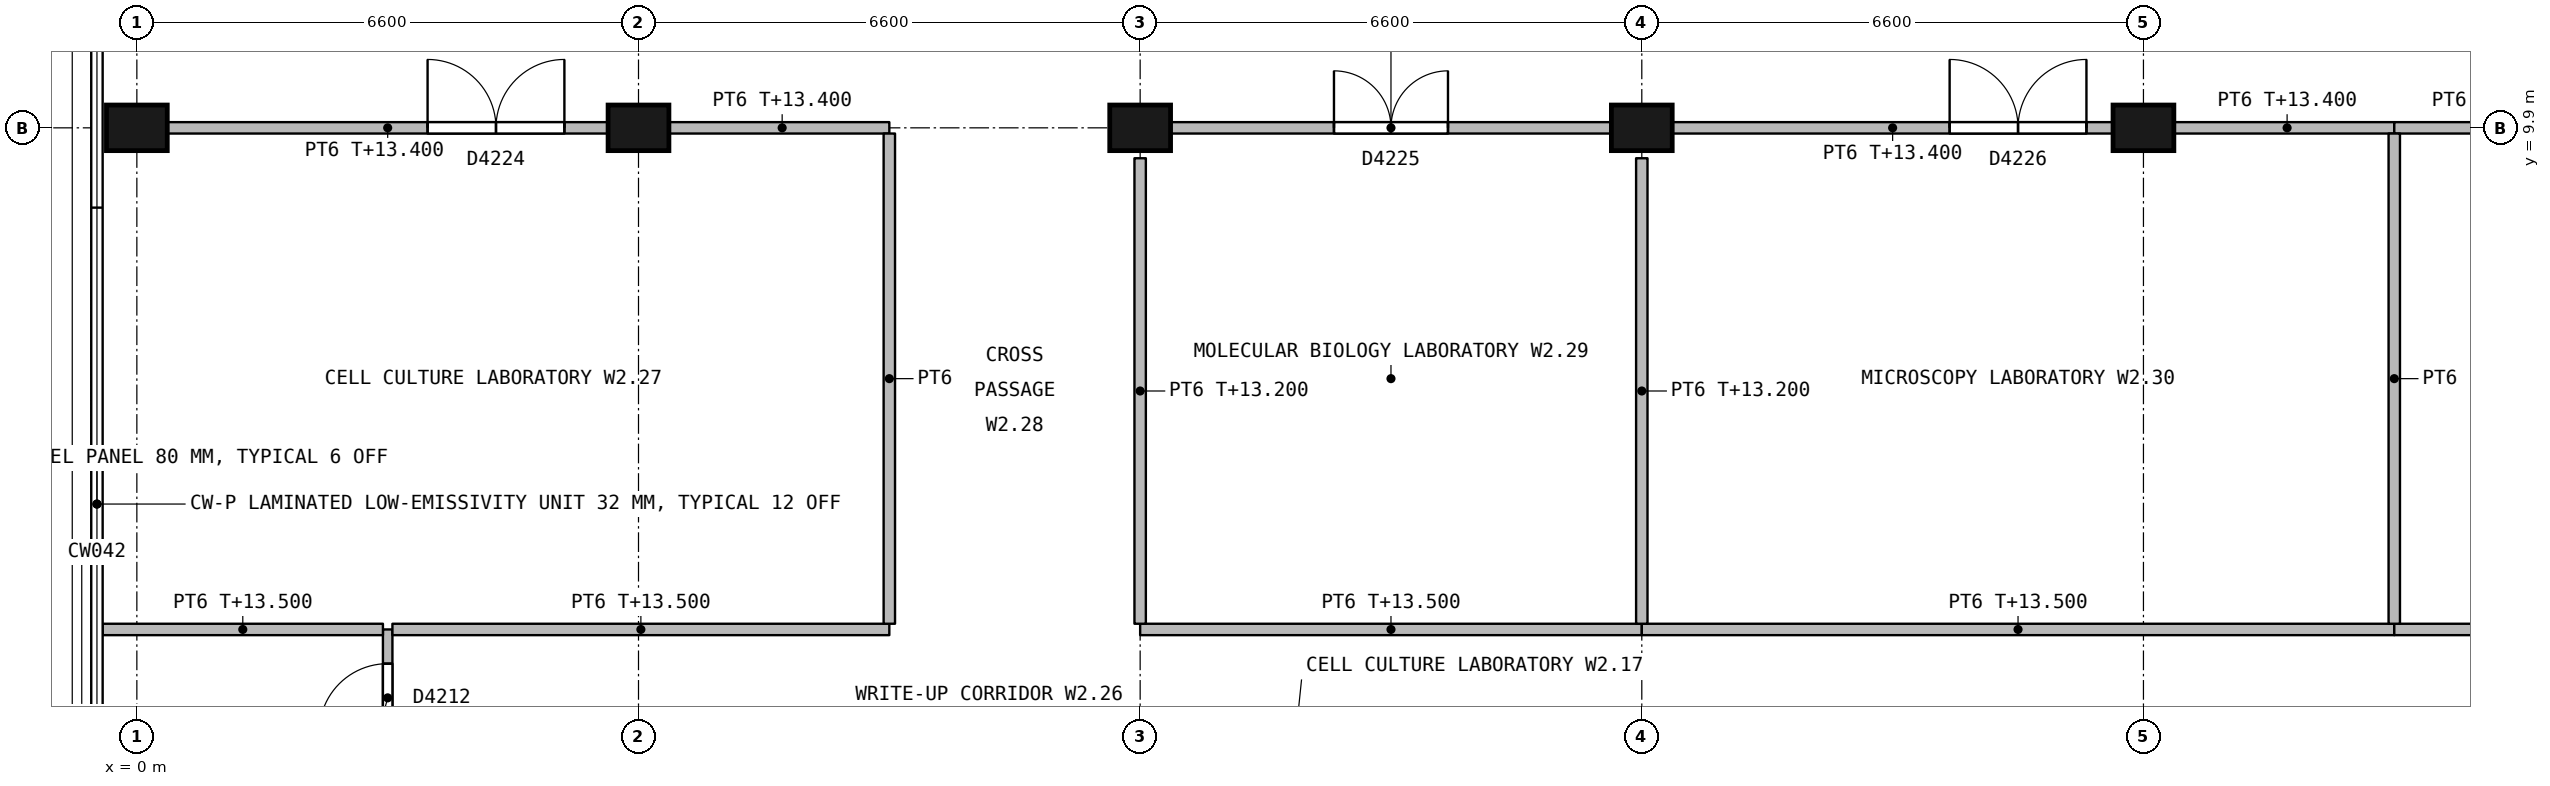
"""IFC4 building model, lengths in metres.
Left out: names, types, materials, properties, quantities, classifications, styles, units other than length and angle.
Written with IfcOpenShell. Run it as: python <this file> out.ifc"""

import sys

from ifc_helpers import new_model, si_unit, direction, frame, frame_2d, origin, origin_2d, place, context, subcontext, project, spatial, rectangle, extrude, element, fill, save


model = new_model("IFC4")
c1 = context("Model", 3, precision=1e-05, world=origin(), true_north=direction((0.0, 1.0)))
c2 = subcontext(c1, "Body", "Model", "MODEL_VIEW")
j1 = project(units=[si_unit("LENGTHUNIT", "METRE"), si_unit("PLANEANGLEUNIT", "RADIAN")], contexts=[c1])
p1 = place(None, origin())
s1 = spatial("IfcSite", under=j1, at=p1, CompositionType="ELEMENT")
p2 = place(p1, origin())
s2 = spatial("IfcBuilding", under=s1, at=p2, CompositionType="ELEMENT")
p3 = place(p2, frame((0.0, 0.0, 9.9)))
s3 = spatial("IfcBuildingStorey", under=s2, at=p3, CompositionType="ELEMENT", Elevation=9.9)
for number, where, z_axis, x_axis in (
    (1, (0.0, 9.9, 0.0), (0.0, 0.0, 1.0), (1.0, 0.0, 0.0)),
    (2, (6.6, 9.9, 0.0), (0.0, 0.0, 1.0), (1.0, 0.0, 0.0)),
    (3, (13.2, 9.9, 0.0), (0.0, 0.0, 1.0), (1.0, 0.0, 0.0)),
    (4, (19.8, 9.9, 0.0), (0.0, 0.0, 1.0), (1.0, 0.0, 0.0)),
    (5, (26.4, 9.9, 0.0), (0.0, 0.0, 1.0), (1.0, 0.0, 0.0)),
):
    element("IfcColumn", number, at=place(p3, frame(where, z_axis=z_axis, x_axis=x_axis)), inside=s3, PredefinedType="COLUMN", context=c2, shape_type="SweptSolid", body=[
        extrude(rectangle(XDim=0.8, YDim=0.6, at=origin_2d()), origin(), (0.0, 0.0, 1.0), 4.5),
    ])
p4 = place(p3, frame((0.4, 9.9, 0.0), z_axis=(0.0, 0.0, 1.0), x_axis=(1.0, 0.0, 0.0)))
e6 = element("IfcWall", 6, at=p4, inside=s3, PredefinedType="PARTITIONING", context=c2, shape_type="SweptSolid", body=[
    extrude(rectangle(XDim=5.8, YDim=0.15, at=frame_2d((2.9, 0.0))), origin(), (0.0, 0.0, 1.0), 3.5),
])
p5 = place(p4, frame((3.425, 0.0, 0.0)))
e7 = element("IfcOpeningElement", 7, at=p5, cuts=e6, PredefinedType="OPENING", context=c2, shape_type="SweptSolid", body=[
    extrude(rectangle(XDim=1.8, YDim=2.4, at=frame_2d((0.9, 1.2))), frame((0.0, 0.085, 0.0), z_axis=(0.0, -1.0, 0.0), x_axis=(1.0, 0.0, 0.0)), (0.0, 0.0, 1.0), 0.17),
])
p6 = place(p3, frame((7.0, 9.9, 0.0), z_axis=(0.0, 0.0, 1.0), x_axis=(1.0, 0.0, 0.0)))
e8 = element("IfcWall", 8, at=p6, inside=s3, PredefinedType="PARTITIONING", context=c2, shape_type="SweptSolid", body=[
    extrude(rectangle(XDim=2.9, YDim=0.15, at=frame_2d((1.45, 0.0))), origin(), (0.0, 0.0, 1.0), 3.5),
])
p7 = place(p3, frame((13.6, 9.9, 0.0), z_axis=(0.0, 0.0, 1.0), x_axis=(1.0, 0.0, 0.0)))
e9 = element("IfcWall", 9, at=p7, inside=s3, PredefinedType="PARTITIONING", context=c2, shape_type="SweptSolid", body=[
    extrude(rectangle(XDim=5.8, YDim=0.15, at=frame_2d((2.9, 0.0))), origin(), (0.0, 0.0, 1.0), 3.5),
])
p8 = place(p7, frame((2.15, 0.0, 0.0)))
e10 = element("IfcOpeningElement", 10, at=p8, cuts=e9, PredefinedType="OPENING", context=c2, shape_type="SweptSolid", body=[
    extrude(rectangle(XDim=1.5, YDim=2.1, at=frame_2d((0.75, 1.05))), frame((0.0, 0.085, 0.0), z_axis=(0.0, -1.0, 0.0), x_axis=(1.0, 0.0, 0.0)), (0.0, 0.0, 1.0), 0.17),
])
p9 = place(p3, frame((20.2, 9.9, 0.0), z_axis=(0.0, 0.0, 1.0), x_axis=(1.0, 0.0, 0.0)))
e11 = element("IfcWall", 11, at=p9, inside=s3, PredefinedType="PARTITIONING", context=c2, shape_type="SweptSolid", body=[
    extrude(rectangle(XDim=5.8, YDim=0.15, at=frame_2d((2.9, 0.0))), origin(), (0.0, 0.0, 1.0), 3.5),
])
p10 = place(p9, frame((3.65, 0.0, 0.0)))
e12 = element("IfcOpeningElement", 12, at=p10, cuts=e11, PredefinedType="OPENING", context=c2, shape_type="SweptSolid", body=[
    extrude(rectangle(XDim=1.8, YDim=2.4, at=frame_2d((0.9, 1.2))), frame((0.0, 0.085, 0.0), z_axis=(0.0, -1.0, 0.0), x_axis=(1.0, 0.0, 0.0)), (0.0, 0.0, 1.0), 0.17),
])
p11 = place(p3, frame((26.8, 9.9, 0.0), z_axis=(0.0, 0.0, 1.0), x_axis=(1.0, 0.0, 0.0)))
e13 = element("IfcWall", 13, at=p11, inside=s3, PredefinedType="PARTITIONING", context=c2, shape_type="SweptSolid", body=[
    extrude(rectangle(XDim=2.9, YDim=0.15, at=frame_2d((1.45, 0.0))), origin(), (0.0, 0.0, 1.0), 3.5),
])
p12 = place(p3, frame((29.7, 9.9, 0.0), z_axis=(0.0, 0.0, 1.0), x_axis=(1.0, 0.0, 0.0)))
e14 = element("IfcWall", 14, at=p12, inside=s3, PredefinedType="PARTITIONING", context=c2, shape_type="SweptSolid", body=[
    extrude(rectangle(XDim=2.9, YDim=0.15, at=frame_2d((1.45, 0.0))), origin(), (0.0, 0.0, 1.0), 3.5),
])
p13 = place(p3, frame((3.3, 1.5, 0.0), z_axis=(0.0, 0.0, 1.0), x_axis=(0.0, 1.0, 0.0)))
e15 = element("IfcWall", 15, at=p13, inside=s3, PredefinedType="PARTITIONING", context=c2, shape_type="SweptSolid", body=[
    extrude(rectangle(XDim=1.8, YDim=0.125, at=frame_2d((0.9, 0.0))), origin(), (0.0, 0.0, 1.0), 4.2),
])
p14 = place(p13, frame((0.45, 0.0, 0.0)))
e16 = element("IfcOpeningElement", 16, at=p14, cuts=e15, PredefinedType="OPENING", context=c2, shape_type="SweptSolid", body=[
    extrude(rectangle(XDim=0.9, YDim=2.1, at=frame_2d((0.45, 1.05))), frame((0.0, 0.073, 0.0), z_axis=(0.0, -1.0, 0.0), x_axis=(1.0, 0.0, 0.0)), (0.0, 0.0, 1.0), 0.145),
])
p15 = place(p3, frame((3.238, 3.3, 0.0), z_axis=(0.0, 0.0, 1.0), x_axis=(-1.0, 0.0, 0.0)))
e17 = element("IfcWall", 17, at=p15, inside=s3, PredefinedType="PARTITIONING", context=c2, shape_type="SweptSolid", body=[
    extrude(rectangle(XDim=3.688, YDim=0.15, at=frame_2d((1.844, 0.0))), origin(), (0.0, 0.0, 1.0), 3.6),
])
p16 = place(p3, frame((9.9, 3.3, 0.0), z_axis=(0.0, 0.0, 1.0), x_axis=(-1.0, 0.0, 0.0)))
e18 = element("IfcWall", 18, at=p16, inside=s3, PredefinedType="PARTITIONING", context=c2, shape_type="SweptSolid", body=[
    extrude(rectangle(XDim=6.537, YDim=0.15, at=frame_2d((3.269, 0.0))), origin(), (0.0, 0.0, 1.0), 3.6),
])
p17 = place(p3, frame((19.8, 3.3, 0.0), z_axis=(0.0, 0.0, 1.0), x_axis=(-1.0, 0.0, 0.0)))
e19 = element("IfcWall", 19, at=p17, inside=s3, PredefinedType="PARTITIONING", context=c2, shape_type="SweptSolid", body=[
    extrude(rectangle(XDim=6.6, YDim=0.15, at=frame_2d((3.3, 0.0))), origin(), (0.0, 0.0, 1.0), 3.6),
])
p18 = place(p3, frame((29.7, 3.3, 0.0), z_axis=(0.0, 0.0, 1.0), x_axis=(-1.0, 0.0, 0.0)))
e20 = element("IfcWall", 20, at=p18, inside=s3, PredefinedType="PARTITIONING", context=c2, shape_type="SweptSolid", body=[
    extrude(rectangle(XDim=9.9, YDim=0.15, at=frame_2d((4.95, 0.0))), origin(), (0.0, 0.0, 1.0), 3.6),
])
p19 = place(p3, frame((39.6, 3.3, 0.0), z_axis=(0.0, 0.0, 1.0), x_axis=(-1.0, 0.0, 0.0)))
e21 = element("IfcWall", 21, at=p19, inside=s3, PredefinedType="PARTITIONING", context=c2, shape_type="SweptSolid", body=[
    extrude(rectangle(XDim=9.9, YDim=0.15, at=frame_2d((4.95, 0.0))), origin(), (0.0, 0.0, 1.0), 3.6),
])
p20 = place(p3, frame((9.9, 3.375, 0.0), z_axis=(0.0, 0.0, 1.0), x_axis=(0.0, 1.0, 0.0)))
e22 = element("IfcWall", 22, at=p20, inside=s3, PredefinedType="PARTITIONING", context=c2, shape_type="SweptSolid", body=[
    extrude(rectangle(XDim=6.45, YDim=0.15, at=frame_2d((3.225, 0.0))), origin(), (0.0, 0.0, 1.0), 4.2),
])
for number, where, z_axis, x_axis in (
    (23, (13.2, 3.375, 0.0), (0.0, 0.0, 1.0), (0.0, 1.0, 0.0)),
    (24, (19.8, 3.375, 0.0), (0.0, 0.0, 1.0), (0.0, 1.0, 0.0)),
):
    element("IfcWall", number, at=place(p3, frame(where, z_axis=z_axis, x_axis=x_axis)), inside=s3, PredefinedType="PARTITIONING", context=c2, shape_type="SweptSolid", body=[
        extrude(rectangle(XDim=6.125, YDim=0.15, at=frame_2d((3.062, 0.0))), origin(), (0.0, 0.0, 1.0), 3.3),
    ])
p21 = place(p3, frame((29.7, 3.375, 0.0), z_axis=(0.0, 0.0, 1.0), x_axis=(0.0, 1.0, 0.0)))
e25 = element("IfcWall", 25, at=p21, inside=s3, PredefinedType="PARTITIONING", context=c2, shape_type="SweptSolid", body=[
    extrude(rectangle(XDim=6.45, YDim=0.15, at=frame_2d((3.225, 0.0))), origin(), (0.0, 0.0, 1.0), 4.2),
])
p22 = place(p14, origin())
e26 = element("IfcDoor", 26, at=p22, inside=s3, OperationType="SINGLE_SWING_LEFT", PredefinedType="DOOR", context=c2, shape_type="SweptSolid", body=[
    extrude(rectangle(XDim=0.9, YDim=2.1, at=frame_2d((0.45, 1.05))), frame((0.0, 0.027, 0.0), z_axis=(0.0, -1.0, 0.0), x_axis=(1.0, 0.0, 0.0)), (0.0, 0.0, 1.0), 0.054),
])
fill(e16, e26)
p23 = place(p5, origin())
e27 = element("IfcDoor", 27, at=p23, inside=s3, OperationType="DOUBLE_DOOR_SINGLE_SWING", PredefinedType="DOOR", context=c2, shape_type="SweptSolid", body=[
    extrude(rectangle(XDim=1.8, YDim=2.4, at=frame_2d((0.9, 1.2))), frame((0.0, 0.027, 0.0), z_axis=(0.0, -1.0, 0.0), x_axis=(1.0, 0.0, 0.0)), (0.0, 0.0, 1.0), 0.054),
])
fill(e7, e27)
p24 = place(p8, origin())
e28 = element("IfcDoor", 28, at=p24, inside=s3, OperationType="DOUBLE_DOOR_SINGLE_SWING", PredefinedType="DOOR", context=c2, shape_type="SweptSolid", body=[
    extrude(rectangle(XDim=1.5, YDim=2.1, at=frame_2d((0.75, 1.05))), frame((0.0, 0.027, 0.0), z_axis=(0.0, -1.0, 0.0), x_axis=(1.0, 0.0, 0.0)), (0.0, 0.0, 1.0), 0.054),
])
fill(e10, e28)
p25 = place(p10, origin())
e29 = element("IfcDoor", 29, at=p25, inside=s3, OperationType="DOUBLE_DOOR_SINGLE_SWING", PredefinedType="DOOR", context=c2, shape_type="SweptSolid", body=[
    extrude(rectangle(XDim=1.8, YDim=2.4, at=frame_2d((0.9, 1.2))), frame((0.0, 0.027, 0.0), z_axis=(0.0, -1.0, 0.0), x_axis=(1.0, 0.0, 0.0)), (0.0, 0.0, 1.0), 0.054),
])
fill(e12, e29)
save(model, sys.argv[1])
